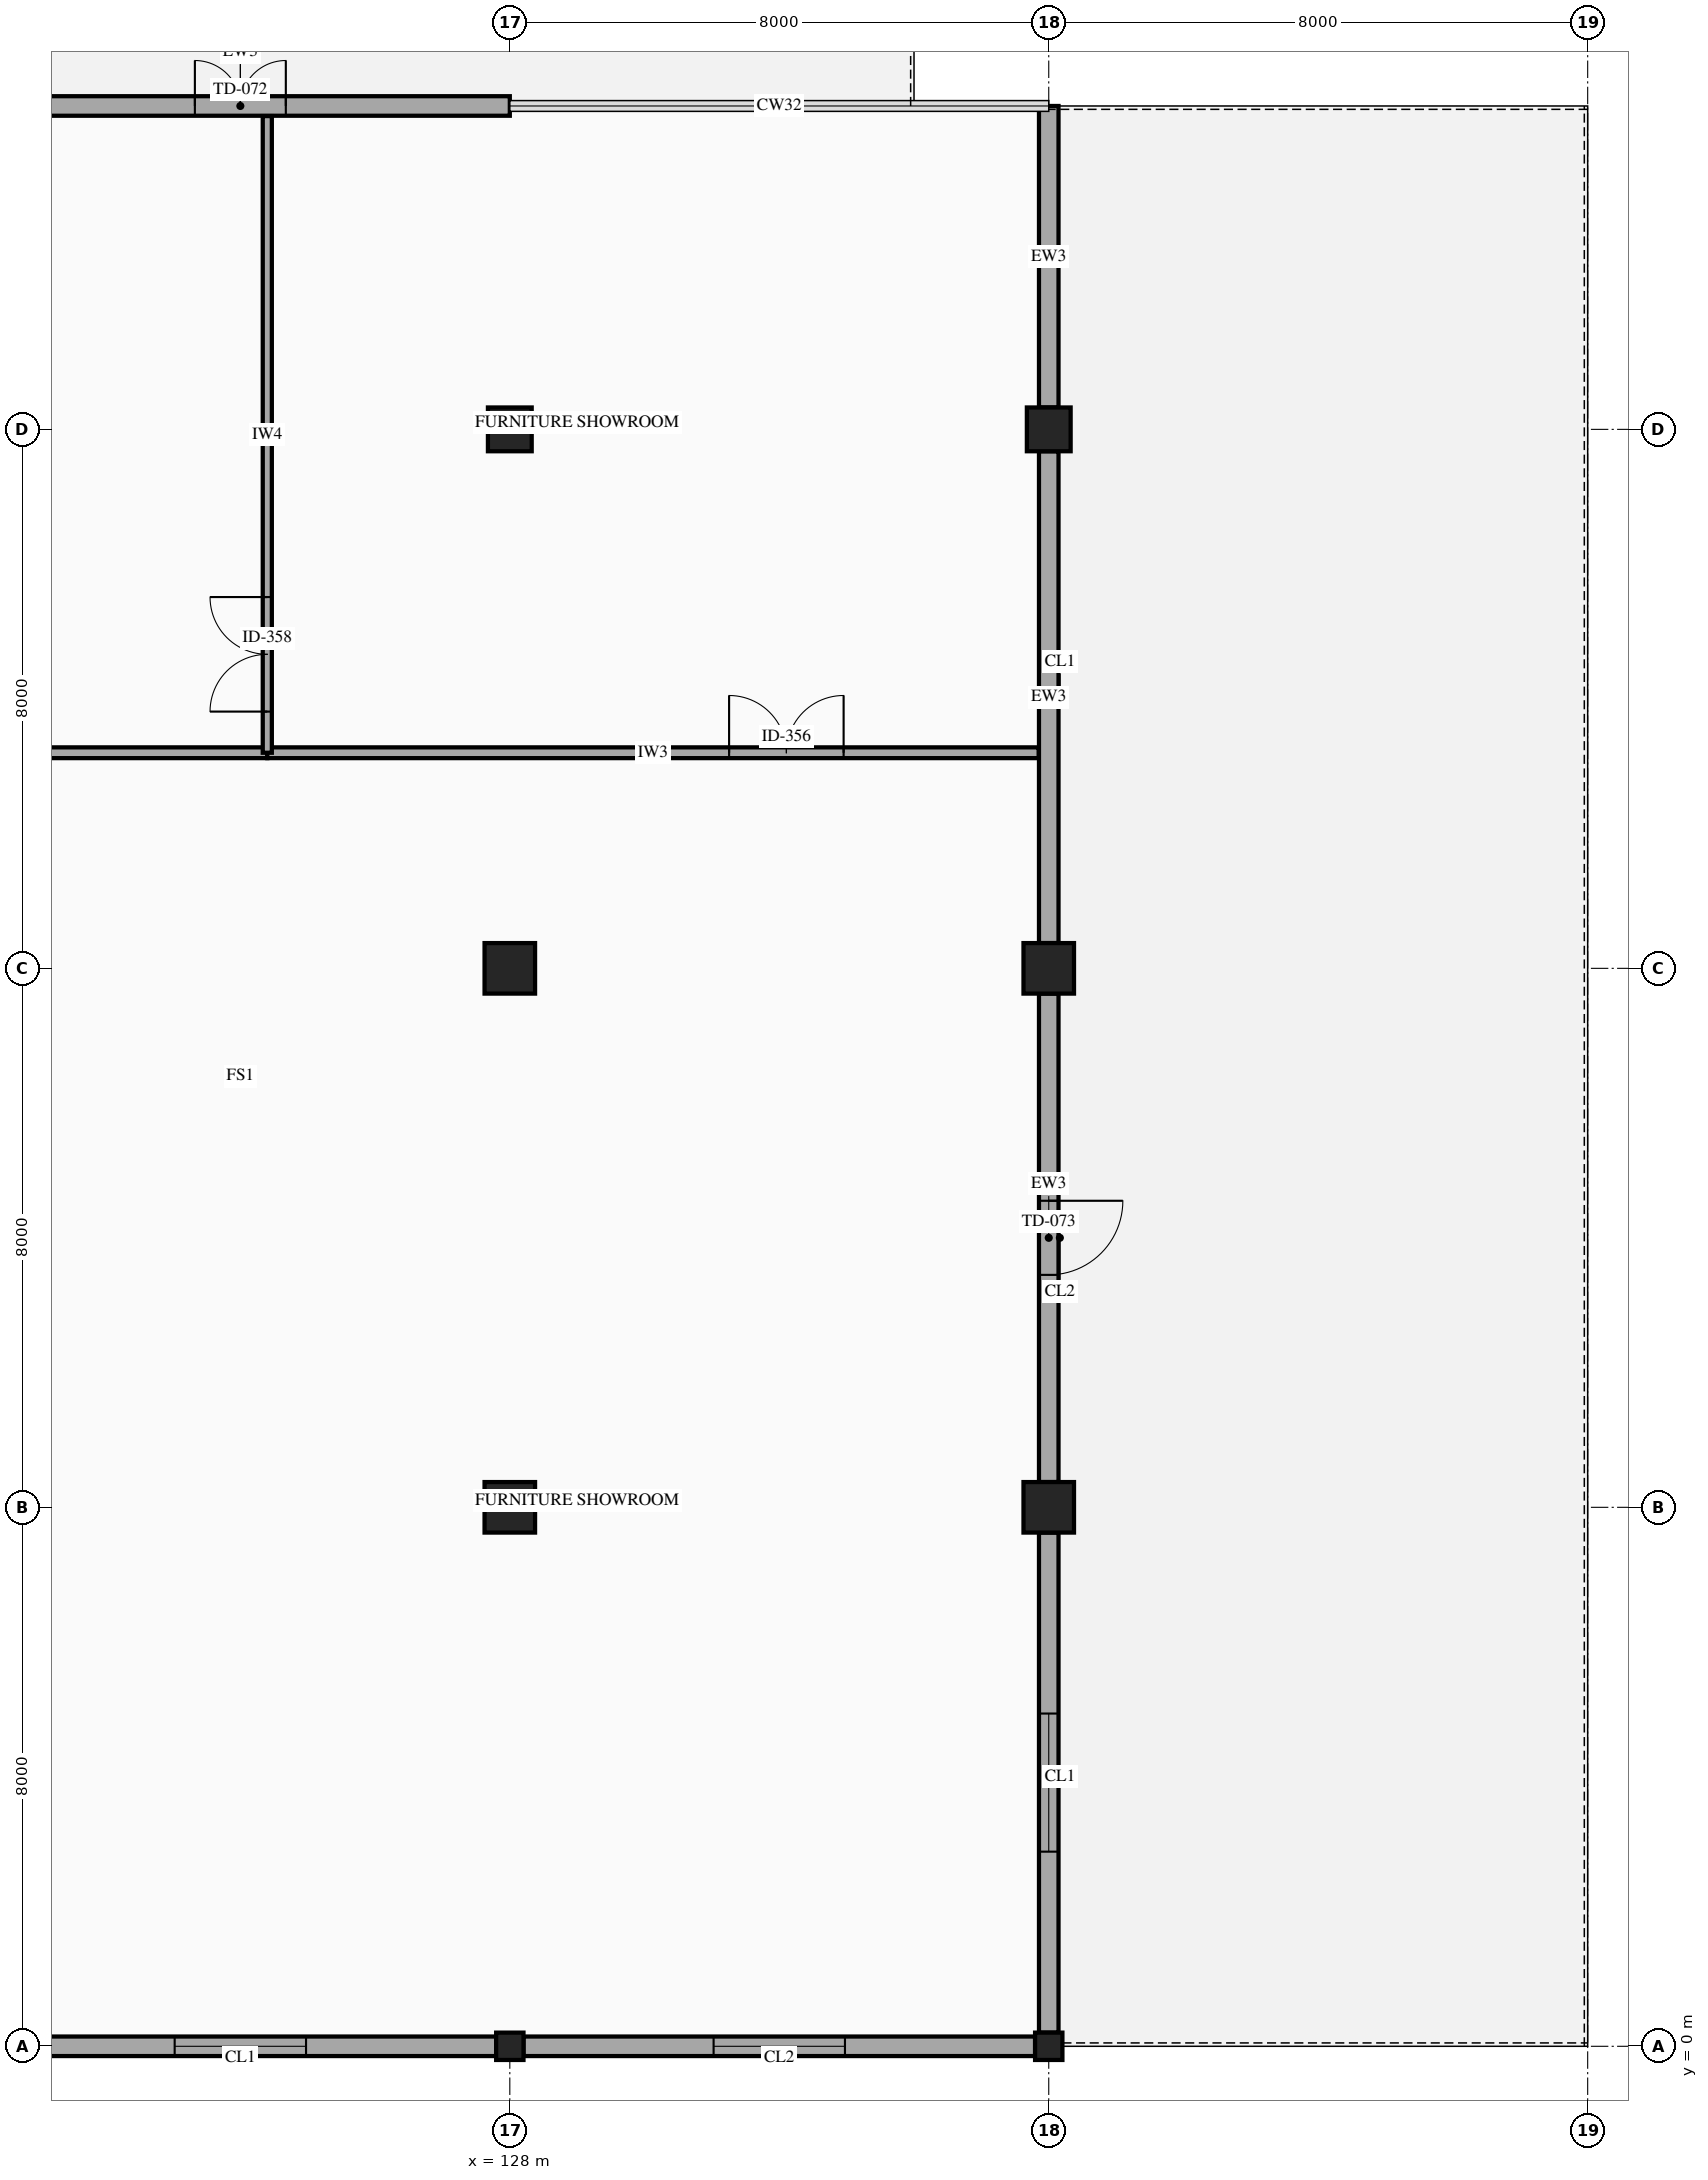
"""IFC4 building model, lengths in metres.
Left out: names, types, materials, properties, quantities, classifications, styles, units other than length and angle.
Written with IfcOpenShell. Run it as: python <this file> out.ifc"""

import sys

from ifc_helpers import new_model, si_unit, direction, frame, frame_2d, origin, origin_2d, place, context, subcontext, project, spatial, rectangle, hollow_rectangle, extrude, element, fill, save


model = new_model("IFC4")
c1 = context("Model", 3, precision=1e-05, world=origin(), true_north=direction((0.0, 1.0)))
c2 = subcontext(c1, "Body", "Model", "MODEL_VIEW")
j1 = project(units=[si_unit("LENGTHUNIT", "METRE"), si_unit("PLANEANGLEUNIT", "RADIAN")], contexts=[c1])
p1 = place(None, origin())
s1 = spatial("IfcSite", under=j1, at=p1, CompositionType="ELEMENT")
p2 = place(p1, origin())
s2 = spatial("IfcBuilding", under=s1, at=p2, CompositionType="ELEMENT")
p3 = place(p2, frame((0.0, 0.0, 19.4)))
s3 = spatial("IfcBuildingStorey", under=s2, at=p3, CompositionType="ELEMENT", Elevation=19.4)
p4 = place(p3, frame((128.0, 0.0, 0.0), z_axis=(0.0, 0.0, 1.0), x_axis=(1.0, 0.0, 0.0)))
e1 = element("IfcColumn", 1, at=p4, inside=s3, PredefinedType="COLUMN", context=c2, shape_type="SweptSolid", body=[
    extrude(hollow_rectangle(XDim=0.406, YDim=0.406, WallThickness=0.015, InnerFilletRadius=0.015, OuterFilletRadius=0.029, at=origin_2d()), origin(), (0.0, 0.0, 1.0), 4.5),
])
for number, where, z_axis, x_axis in (
    (2, (128.0, 8.0, 0.0), (0.0, 0.0, 1.0), (1.0, 0.0, 0.0)),
    (3, (128.0, 16.0, 0.0), (0.0, 0.0, 1.0), (1.0, 0.0, 0.0)),
):
    element("IfcColumn", number, at=place(p3, frame(where, z_axis=z_axis, x_axis=x_axis)), inside=s3, PredefinedType="COLUMN", context=c2, shape_type="SweptSolid", body=[
        extrude(rectangle(XDim=0.75, YDim=0.75, at=origin_2d()), origin(), (0.0, 0.0, 1.0), 4.5),
    ])
p5 = place(p3, frame((128.0, 24.0, 0.0), z_axis=(0.0, 0.0, 1.0), x_axis=(1.0, 0.0, 0.0)))
e4 = element("IfcColumn", 4, at=p5, inside=s3, PredefinedType="COLUMN", context=c2, shape_type="SweptSolid", body=[
    extrude(rectangle(XDim=0.65, YDim=0.65, at=origin_2d()), origin(), (0.0, 0.0, 1.0), 4.5),
])
p6 = place(p3, frame((136.0, 0.0, 0.0), z_axis=(0.0, 0.0, 1.0), x_axis=(1.0, 0.0, 0.0)))
e5 = element("IfcColumn", 5, at=p6, inside=s3, PredefinedType="COLUMN", context=c2, shape_type="SweptSolid", body=[
    extrude(hollow_rectangle(XDim=0.406, YDim=0.406, WallThickness=0.015, InnerFilletRadius=0.015, OuterFilletRadius=0.029, at=origin_2d()), origin(), (0.0, 0.0, 1.0), 4.5),
])
for number, where, z_axis, x_axis in (
    (6, (136.0, 8.0, 0.0), (0.0, 0.0, 1.0), (1.0, 0.0, 0.0)),
    (7, (136.0, 16.0, 0.0), (0.0, 0.0, 1.0), (1.0, 0.0, 0.0)),
):
    element("IfcColumn", number, at=place(p3, frame(where, z_axis=z_axis, x_axis=x_axis)), inside=s3, PredefinedType="COLUMN", context=c2, shape_type="SweptSolid", body=[
        extrude(rectangle(XDim=0.75, YDim=0.75, at=origin_2d()), origin(), (0.0, 0.0, 1.0), 4.5),
    ])
p7 = place(p3, frame((136.0, 24.0, 0.0), z_axis=(0.0, 0.0, 1.0), x_axis=(1.0, 0.0, 0.0)))
e8 = element("IfcColumn", 8, at=p7, inside=s3, PredefinedType="COLUMN", context=c2, shape_type="SweptSolid", body=[
    extrude(rectangle(XDim=0.65, YDim=0.65, at=origin_2d()), origin(), (0.0, 0.0, 1.0), 4.5),
])
p8 = place(p3, frame((120.0, 28.8, 0.0), z_axis=(0.0, 0.0, 1.0), x_axis=(1.0, 0.0, 0.0)))
e9 = element("IfcWall", 9, at=p8, inside=s3, PredefinedType="STANDARD", context=c2, shape_type="SweptSolid", body=[
    extrude(rectangle(XDim=8.0, YDim=0.29, at=frame_2d((4.0, 0.0))), origin(), (0.0, 0.0, 1.0), 3.48),
])
p9 = place(p8, frame((3.325, 0.0, 0.0)))
e10 = element("IfcOpeningElement", 10, at=p9, cuts=e9, PredefinedType="OPENING", context=c2, shape_type="SweptSolid", body=[
    extrude(rectangle(XDim=1.35, YDim=2.1, at=frame_2d((0.675, 1.05))), frame((0.0, 0.155, 0.0), z_axis=(0.0, -1.0, 0.0), x_axis=(1.0, 0.0, 0.0)), (0.0, 0.0, 1.0), 0.31),
])
p10 = place(p3, frame((136.0, 28.8, 0.0), z_axis=(0.0, 0.0, 1.0), x_axis=(0.0, -1.0, 0.0)))
e11 = element("IfcWall", 11, at=p10, inside=s3, PredefinedType="STANDARD", context=c2, shape_type="SweptSolid", body=[
    extrude(rectangle(XDim=4.475, YDim=0.29, at=frame_2d((2.238, 0.0))), origin(), (0.0, 0.0, 1.0), 3.48),
])
p11 = place(p3, frame((136.0, 23.675, 0.0), z_axis=(0.0, 0.0, 1.0), x_axis=(0.0, -1.0, 0.0)))
e12 = element("IfcWall", 12, at=p11, inside=s3, PredefinedType="STANDARD", context=c2, shape_type="SweptSolid", body=[
    extrude(rectangle(XDim=7.3, YDim=0.29, at=frame_2d((3.65, 0.0))), origin(), (0.0, 0.0, 1.0), 3.48),
])
p12 = place(p3, frame((136.0, 15.625, 0.0), z_axis=(0.0, 0.0, 1.0), x_axis=(0.0, -1.0, 0.0)))
e13 = element("IfcWall", 13, at=p12, inside=s3, PredefinedType="STANDARD", context=c2, shape_type="SweptSolid", body=[
    extrude(rectangle(XDim=7.25, YDim=0.29, at=frame_2d((3.625, 0.0))), origin(), (0.0, 0.0, 1.0), 3.48),
])
p13 = place(p12, frame((3.075, 0.0, 0.0)))
e14 = element("IfcOpeningElement", 14, at=p13, cuts=e13, PredefinedType="OPENING", context=c2, shape_type="SweptSolid", body=[
    extrude(rectangle(XDim=1.1, YDim=2.15, at=frame_2d((0.55, 1.075))), frame((0.0, 0.155, 0.0), z_axis=(0.0, -1.0, 0.0), x_axis=(1.0, 0.0, 0.0)), (0.0, 0.0, 1.0), 0.31),
])
p14 = place(p3, frame((136.0, 7.625, 0.0), z_axis=(0.0, 0.0, 1.0), x_axis=(0.0, -1.0, 0.0)))
e15 = element("IfcWall", 15, at=p14, inside=s3, PredefinedType="STANDARD", context=c2, shape_type="SweptSolid", body=[
    extrude(rectangle(XDim=7.422, YDim=0.29, at=frame_2d((3.711, 0.0))), origin(), (0.0, 0.0, 1.0), 3.48),
])
p15 = place(p14, frame((2.686, 0.0, 0.8)))
e16 = element("IfcOpeningElement", 16, at=p15, cuts=e15, PredefinedType="OPENING", context=c2, shape_type="SweptSolid", body=[
    extrude(rectangle(XDim=2.05, YDim=1.95, at=frame_2d((1.025, 0.975))), frame((0.0, 0.155, 0.0), z_axis=(0.0, -1.0, 0.0), x_axis=(1.0, 0.0, 0.0)), (0.0, 0.0, 1.0), 0.31),
])
p16 = place(p3, frame((135.797, 0.0, 0.0), z_axis=(0.0, 0.0, 1.0), x_axis=(-1.0, 0.0, 0.0)))
e17 = element("IfcWall", 17, at=p16, inside=s3, PredefinedType="STANDARD", context=c2, shape_type="SweptSolid", body=[
    extrude(rectangle(XDim=7.594, YDim=0.29, at=frame_2d((3.797, 0.0))), origin(), (0.0, 0.0, 1.0), 3.48),
])
p17 = place(p16, frame((2.822, 0.0, 0.8)))
e18 = element("IfcOpeningElement", 18, at=p17, cuts=e17, PredefinedType="OPENING", context=c2, shape_type="SweptSolid", body=[
    extrude(rectangle(XDim=1.95, YDim=1.8, at=frame_2d((0.975, 0.9))), frame((0.0, 0.155, 0.0), z_axis=(0.0, -1.0, 0.0), x_axis=(1.0, 0.0, 0.0)), (0.0, 0.0, 1.0), 0.31),
])
p18 = place(p3, frame((127.797, 0.0, 0.0), z_axis=(0.0, 0.0, 1.0), x_axis=(-1.0, 0.0, 0.0)))
e19 = element("IfcWall", 19, at=p18, inside=s3, PredefinedType="STANDARD", context=c2, shape_type="SweptSolid", body=[
    extrude(rectangle(XDim=7.594, YDim=0.29, at=frame_2d((3.797, 0.0))), origin(), (0.0, 0.0, 1.0), 3.48),
])
p19 = place(p18, frame((2.822, 0.0, 0.8)))
e20 = element("IfcOpeningElement", 20, at=p19, cuts=e19, PredefinedType="OPENING", context=c2, shape_type="SweptSolid", body=[
    extrude(rectangle(XDim=1.95, YDim=1.8, at=frame_2d((0.975, 0.9))), frame((0.0, 0.155, 0.0), z_axis=(0.0, -1.0, 0.0), x_axis=(1.0, 0.0, 0.0)), (0.0, 0.0, 1.0), 0.31),
])
p20 = place(p3, frame((104.4, 19.2, 0.0), z_axis=(0.0, 0.0, 1.0), x_axis=(1.0, 0.0, 0.0)))
e21 = element("IfcWall", 21, at=p20, inside=s3, PredefinedType="PARTITIONING", context=c2, shape_type="SweptSolid", body=[
    extrude(rectangle(XDim=20.0, YDim=0.16, at=frame_2d((10.0, 0.0))), origin(), (0.0, 0.0, 1.0), 3.48),
])
p21 = place(p20, frame((2.82, 0.0, 0.0)))
e22 = element("IfcOpeningElement", 22, at=p21, cuts=e21, PredefinedType="OPENING", context=c2, shape_type="SweptSolid", body=[
    extrude(rectangle(XDim=1.7, YDim=2.25, at=frame_2d((0.85, 1.125))), frame((0.0, 0.09, 0.0), z_axis=(0.0, -1.0, 0.0), x_axis=(1.0, 0.0, 0.0)), (0.0, 0.0, 1.0), 0.18),
])
p22 = place(p3, frame((124.4, 19.2, 0.0), z_axis=(0.0, 0.0, 1.0), x_axis=(1.0, 0.0, 0.0)))
e23 = element("IfcWall", 23, at=p22, inside=s3, PredefinedType="PARTITIONING", context=c2, shape_type="SweptSolid", body=[
    extrude(rectangle(XDim=11.45, YDim=0.16, at=frame_2d((5.725, 0.0))), origin(), (0.0, 0.0, 1.0), 3.48),
])
p23 = place(p22, frame((6.855, 0.0, 0.0)))
e24 = element("IfcOpeningElement", 24, at=p23, cuts=e23, PredefinedType="OPENING", context=c2, shape_type="SweptSolid", body=[
    extrude(rectangle(XDim=1.7, YDim=2.25, at=frame_2d((0.85, 1.125))), frame((0.0, 0.09, 0.0), z_axis=(0.0, -1.0, 0.0), x_axis=(1.0, 0.0, 0.0)), (0.0, 0.0, 1.0), 0.18),
])
p24 = place(p3, frame((124.4, 19.2, 0.0), z_axis=(0.0, 0.0, 1.0), x_axis=(0.0, 1.0, 0.0)))
e25 = element("IfcWall", 25, at=p24, inside=s3, PredefinedType="PARTITIONING", context=c2, shape_type="SweptSolid", body=[
    extrude(rectangle(XDim=9.45, YDim=0.135, at=frame_2d((4.725, 0.0))), origin(), (0.0, 0.0, 1.0), 3.48),
])
p25 = place(p24, frame((0.611, 0.0, 0.0)))
e26 = element("IfcOpeningElement", 26, at=p25, cuts=e25, PredefinedType="OPENING", context=c2, shape_type="SweptSolid", body=[
    extrude(rectangle(XDim=1.7, YDim=2.25, at=frame_2d((0.85, 1.125))), frame((0.0, 0.077, 0.0), z_axis=(0.0, -1.0, 0.0), x_axis=(1.0, 0.0, 0.0)), (0.0, 0.0, 1.0), 0.155),
])
p26 = place(p9, origin())
e27 = element("IfcDoor", 27, at=p26, inside=s3, OperationType="DOUBLE_DOOR_SINGLE_SWING", PredefinedType="DOOR", context=c2, shape_type="SweptSolid", body=[
    extrude(rectangle(XDim=1.35, YDim=2.1, at=frame_2d((0.675, 1.05))), frame((0.0, 0.025, 0.0), z_axis=(0.0, -1.0, 0.0), x_axis=(1.0, 0.0, 0.0)), (0.0, 0.0, 1.0), 0.05),
])
fill(e10, e27)
p27 = place(p13, origin())
e28 = element("IfcDoor", 28, at=p27, inside=s3, OperationType="SINGLE_SWING_LEFT", PredefinedType="DOOR", context=c2, shape_type="SweptSolid", body=[
    extrude(rectangle(XDim=1.1, YDim=2.15, at=frame_2d((0.55, 1.075))), frame((0.0, 0.025, 0.0), z_axis=(0.0, -1.0, 0.0), x_axis=(1.0, 0.0, 0.0)), (0.0, 0.0, 1.0), 0.05),
])
fill(e14, e28)
p28 = place(p15, origin())
e29 = element("IfcWindow", 29, at=p28, inside=s3, PartitioningType="DOUBLE_PANEL_VERTICAL", PredefinedType="WINDOW", context=c2, shape_type="SweptSolid", body=[
    extrude(rectangle(XDim=2.05, YDim=1.95, at=frame_2d((1.025, 0.975))), frame((0.0, 0.03, 0.0), z_axis=(0.0, -1.0, 0.0), x_axis=(1.0, 0.0, 0.0)), (0.0, 0.0, 1.0), 0.06),
])
fill(e16, e29)
p29 = place(p17, origin())
e30 = element("IfcWindow", 30, at=p29, inside=s3, PartitioningType="DOUBLE_PANEL_VERTICAL", PredefinedType="WINDOW", context=c2, shape_type="SweptSolid", body=[
    extrude(rectangle(XDim=1.95, YDim=1.8, at=frame_2d((0.975, 0.9))), frame((0.0, 0.03, 0.0), z_axis=(0.0, -1.0, 0.0), x_axis=(1.0, 0.0, 0.0)), (0.0, 0.0, 1.0), 0.06),
])
fill(e18, e30)
p30 = place(p19, origin())
e31 = element("IfcWindow", 31, at=p30, inside=s3, PartitioningType="DOUBLE_PANEL_VERTICAL", PredefinedType="WINDOW", context=c2, shape_type="SweptSolid", body=[
    extrude(rectangle(XDim=1.95, YDim=1.8, at=frame_2d((0.975, 0.9))), frame((0.0, 0.03, 0.0), z_axis=(0.0, -1.0, 0.0), x_axis=(1.0, 0.0, 0.0)), (0.0, 0.0, 1.0), 0.06),
])
fill(e20, e31)
p31 = place(p23, origin())
e32 = element("IfcDoor", 32, at=p31, inside=s3, OperationType="DOUBLE_DOOR_SINGLE_SWING", PredefinedType="DOOR", context=c2, shape_type="SweptSolid", body=[
    extrude(rectangle(XDim=1.7, YDim=2.25, at=frame_2d((0.85, 1.125))), frame((0.0, 0.025, 0.0), z_axis=(0.0, -1.0, 0.0), x_axis=(1.0, 0.0, 0.0)), (0.0, 0.0, 1.0), 0.05),
])
fill(e24, e32)
p32 = place(p25, origin())
e33 = element("IfcDoor", 33, at=p32, inside=s3, OperationType="DOUBLE_DOOR_SINGLE_SWING", PredefinedType="DOOR", context=c2, shape_type="SweptSolid", body=[
    extrude(rectangle(XDim=1.7, YDim=2.25, at=frame_2d((0.85, 1.125))), frame((0.0, 0.025, 0.0), z_axis=(0.0, -1.0, 0.0), x_axis=(1.0, 0.0, 0.0)), (0.0, 0.0, 1.0), 0.05),
])
fill(e26, e33)
save(model, sys.argv[1])
